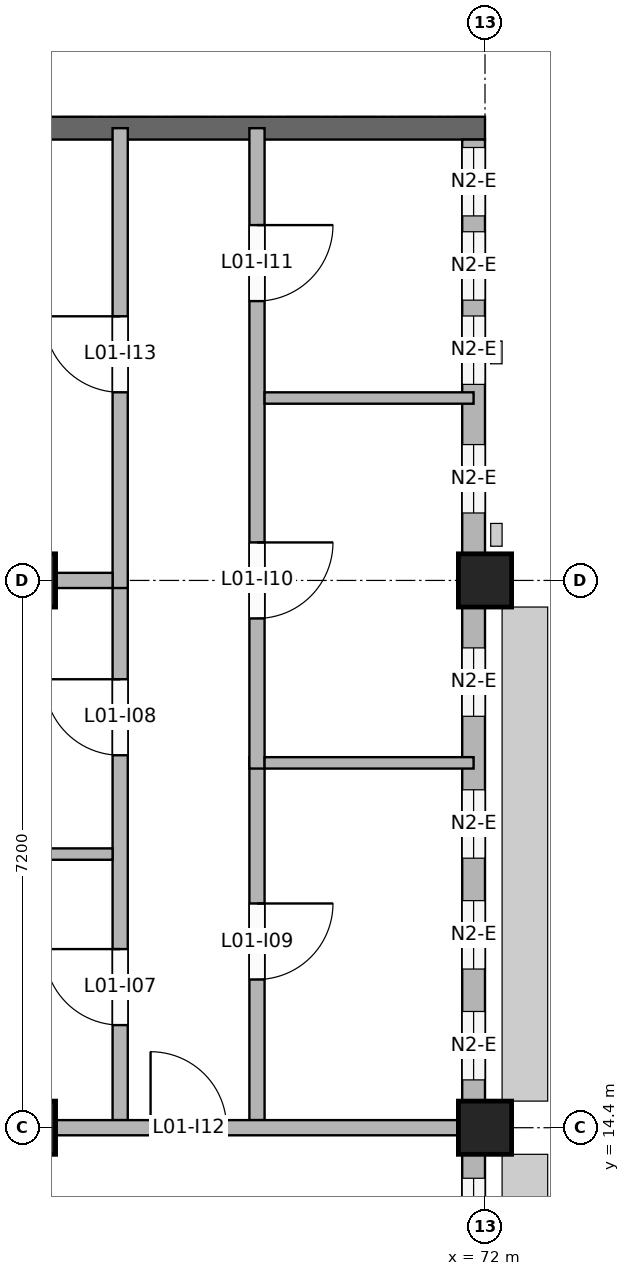
"""IFC4 building model, lengths in metres.
Left out: names, types, materials, properties, quantities, classifications, styles, units other than length and angle.
Written with IfcOpenShell. Run it as: python <this file> out.ifc"""

import sys

from ifc_helpers import new_model, si_unit, direction, frame, frame_2d, origin, origin_2d, place, context, subcontext, project, spatial, rectangle, extrude, element, fill, save


model = new_model("IFC4")
c1 = context("Model", 3, precision=1e-05, world=origin(), true_north=direction((0.0, 1.0)))
c2 = subcontext(c1, "Body", "Model", "MODEL_VIEW")
j1 = project(units=[si_unit("LENGTHUNIT", "METRE"), si_unit("PLANEANGLEUNIT", "RADIAN")], contexts=[c1])
p1 = place(None, origin())
s1 = spatial("IfcSite", under=j1, at=p1, CompositionType="ELEMENT")
p2 = place(p1, origin())
s2 = spatial("IfcBuilding", under=s1, at=p2, CompositionType="ELEMENT")
p3 = place(p2, frame((0.0, 0.0, 4.2)))
s3 = spatial("IfcBuildingStorey", under=s2, at=p3, CompositionType="ELEMENT", Elevation=4.2)
for number, where, z_axis, x_axis in (
    (1, (66.0, 14.4, 0.0), (0.0, 0.0, 1.0), (1.0, 0.0, 0.0)),
    (2, (72.0, 14.4, 0.0), (0.0, 0.0, 1.0), (1.0, 0.0, 0.0)),
    (3, (66.0, 21.6, 0.0), (0.0, 0.0, 1.0), (1.0, 0.0, 0.0)),
    (4, (72.0, 21.6, 0.0), (0.0, 0.0, 1.0), (1.0, 0.0, 0.0)),
):
    element("IfcColumn", number, at=place(p3, frame(where, z_axis=z_axis, x_axis=x_axis)), inside=s3, PredefinedType="COLUMN", context=c2, shape_type="SweptSolid", body=[
        extrude(rectangle(XDim=0.7, YDim=0.7, at=origin_2d()), origin(), (0.0, 0.0, 1.0), 3.95),
    ])
p4 = place(p3, frame((71.85, 7.2, 0.0), z_axis=(0.0, 0.0, 1.0), x_axis=(0.0, 1.0, 0.0)))
e5 = element("IfcWall", 5, at=p4, inside=s3, PredefinedType="SOLIDWALL", context=c2, shape_type="SweptSolid", body=[
    extrude(rectangle(XDim=6.85, YDim=0.3, at=frame_2d((3.425, 0.0))), origin(), (0.0, 0.0, 1.0), 3.05),
])
p5 = place(p4, frame((5.635, 0.0, 0.9)))
e6 = element("IfcOpeningElement", 6, at=p5, cuts=e5, PredefinedType="OPENING", context=c2, shape_type="SweptSolid", body=[
    extrude(rectangle(XDim=0.9, YDim=1.2, at=frame_2d((0.45, 0.6))), frame((0.0, 0.16, 0.0), z_axis=(0.0, -1.0, 0.0), x_axis=(1.0, 0.0, 0.0)), (0.0, 0.0, 1.0), 0.32),
])
p6 = place(p3, frame((71.85, 14.75, 0.0), z_axis=(0.0, 0.0, 1.0), x_axis=(0.0, 1.0, 0.0)))
e7 = element("IfcWall", 7, at=p6, inside=s3, PredefinedType="SOLIDWALL", context=c2, shape_type="SweptSolid", body=[
    extrude(rectangle(XDim=6.5, YDim=0.3, at=frame_2d((3.25, 0.0))), origin(), (0.0, 0.0, 1.0), 3.05),
])
p7 = place(p6, frame((0.279, 0.0, 0.9)))
e8 = element("IfcOpeningElement", 8, at=p7, cuts=e7, PredefinedType="OPENING", context=c2, shape_type="SweptSolid", body=[
    extrude(rectangle(XDim=0.9, YDim=1.2, at=frame_2d((0.45, 0.6))), frame((0.0, 0.16, 0.0), z_axis=(0.0, -1.0, 0.0), x_axis=(1.0, 0.0, 0.0)), (0.0, 0.0, 1.0), 0.32),
])
p8 = place(p6, frame((1.738, 0.0, 0.9)))
e9 = element("IfcOpeningElement", 9, at=p8, cuts=e7, PredefinedType="OPENING", context=c2, shape_type="SweptSolid", body=[
    extrude(rectangle(XDim=0.9, YDim=1.2, at=frame_2d((0.45, 0.6))), frame((0.0, 0.16, 0.0), z_axis=(0.0, -1.0, 0.0), x_axis=(1.0, 0.0, 0.0)), (0.0, 0.0, 1.0), 0.32),
])
p9 = place(p6, frame((3.196, 0.0, 0.9)))
e10 = element("IfcOpeningElement", 10, at=p9, cuts=e7, PredefinedType="OPENING", context=c2, shape_type="SweptSolid", body=[
    extrude(rectangle(XDim=0.9, YDim=1.2, at=frame_2d((0.45, 0.6))), frame((0.0, 0.16, 0.0), z_axis=(0.0, -1.0, 0.0), x_axis=(1.0, 0.0, 0.0)), (0.0, 0.0, 1.0), 0.32),
])
p10 = place(p6, frame((5.062, 0.0, 0.9)))
e11 = element("IfcOpeningElement", 11, at=p10, cuts=e7, PredefinedType="OPENING", context=c2, shape_type="SweptSolid", body=[
    extrude(rectangle(XDim=0.9, YDim=1.2, at=frame_2d((0.45, 0.6))), frame((0.0, 0.16, 0.0), z_axis=(0.0, -1.0, 0.0), x_axis=(1.0, 0.0, 0.0)), (0.0, 0.0, 1.0), 0.32),
])
p11 = place(p3, frame((71.85, 21.95, 0.0), z_axis=(0.0, 0.0, 1.0), x_axis=(0.0, 1.0, 0.0)))
e12 = element("IfcWall", 12, at=p11, inside=s3, PredefinedType="SOLIDWALL", context=c2, shape_type="SweptSolid", body=[
    extrude(rectangle(XDim=5.45, YDim=0.3, at=frame_2d((2.725, 0.0))), origin(), (0.0, 0.0, 1.0), 3.75),
])
p12 = place(p11, frame((0.538, 0.0, 0.9)))
e13 = element("IfcOpeningElement", 13, at=p12, cuts=e12, PredefinedType="OPENING", context=c2, shape_type="SweptSolid", body=[
    extrude(rectangle(XDim=0.9, YDim=1.2, at=frame_2d((0.45, 0.6))), frame((0.0, 0.16, 0.0), z_axis=(0.0, -1.0, 0.0), x_axis=(1.0, 0.0, 0.0)), (0.0, 0.0, 1.0), 0.32),
])
p13 = place(p11, frame((2.229, 0.0, 0.9)))
e14 = element("IfcOpeningElement", 14, at=p13, cuts=e12, PredefinedType="OPENING", context=c2, shape_type="SweptSolid", body=[
    extrude(rectangle(XDim=0.9, YDim=1.2, at=frame_2d((0.45, 0.6))), frame((0.0, 0.16, 0.0), z_axis=(0.0, -1.0, 0.0), x_axis=(1.0, 0.0, 0.0)), (0.0, 0.0, 1.0), 0.32),
])
p14 = place(p11, frame((3.337, 0.0, 0.9)))
e15 = element("IfcOpeningElement", 15, at=p14, cuts=e12, PredefinedType="OPENING", context=c2, shape_type="SweptSolid", body=[
    extrude(rectangle(XDim=0.9, YDim=1.2, at=frame_2d((0.45, 0.6))), frame((0.0, 0.16, 0.0), z_axis=(0.0, -1.0, 0.0), x_axis=(1.0, 0.0, 0.0)), (0.0, 0.0, 1.0), 0.32),
])
p15 = place(p11, frame((4.446, 0.0, 0.9)))
e16 = element("IfcOpeningElement", 16, at=p15, cuts=e12, PredefinedType="OPENING", context=c2, shape_type="SweptSolid", body=[
    extrude(rectangle(XDim=0.9, YDim=1.2, at=frame_2d((0.45, 0.6))), frame((0.0, 0.16, 0.0), z_axis=(0.0, -1.0, 0.0), x_axis=(1.0, 0.0, 0.0)), (0.0, 0.0, 1.0), 0.32),
])
p16 = place(p3, frame((60.0, 27.55, 0.0), z_axis=(0.0, 0.0, 1.0), x_axis=(1.0, 0.0, 0.0)))
e17 = element("IfcWall", 17, at=p16, inside=s3, PredefinedType="SOLIDWALL", context=c2, shape_type="SweptSolid", body=[
    extrude(rectangle(XDim=12.0, YDim=0.3, at=frame_2d((6.0, 0.0))), origin(), (0.0, 0.0, 1.0), 3.75),
])
p17 = place(p3, frame((67.2, 14.5, 0.0), z_axis=(0.0, 0.0, 1.0), x_axis=(0.0, 1.0, 0.0)))
e18 = element("IfcWall", 18, at=p17, inside=s3, PredefinedType="PARTITIONING", context=c2, shape_type="SweptSolid", body=[
    extrude(rectangle(XDim=7.2, YDim=0.2, at=frame_2d((3.6, 0.0))), origin(), (0.0, 0.0, 1.0), 2.55),
])
p18 = place(p17, frame((1.25, 0.0, 0.0)))
e19 = element("IfcOpeningElement", 19, at=p18, cuts=e18, PredefinedType="OPENING", context=c2, shape_type="SweptSolid", body=[
    extrude(rectangle(XDim=1.0, YDim=2.1, at=frame_2d((0.5, 1.05))), frame((0.0, 0.11, 0.0), z_axis=(0.0, -1.0, 0.0), x_axis=(1.0, 0.0, 0.0)), (0.0, 0.0, 1.0), 0.22),
])
p19 = place(p17, frame((4.8, 0.0, 0.0)))
e20 = element("IfcOpeningElement", 20, at=p19, cuts=e18, PredefinedType="OPENING", context=c2, shape_type="SweptSolid", body=[
    extrude(rectangle(XDim=1.0, YDim=2.1, at=frame_2d((0.5, 1.05))), frame((0.0, 0.11, 0.0), z_axis=(0.0, -1.0, 0.0), x_axis=(1.0, 0.0, 0.0)), (0.0, 0.0, 1.0), 0.22),
])
p20 = place(p3, frame((67.2, 21.5, 0.0), z_axis=(0.0, 0.0, 1.0), x_axis=(0.0, 1.0, 0.0)))
e21 = element("IfcWall", 21, at=p20, inside=s3, PredefinedType="PARTITIONING", context=c2, shape_type="SweptSolid", body=[
    extrude(rectangle(XDim=6.05, YDim=0.2, at=frame_2d((3.025, 0.0))), origin(), (0.0, 0.0, 1.0), 2.55),
])
p21 = place(p20, frame((2.575, 0.0, 0.0)))
e22 = element("IfcOpeningElement", 22, at=p21, cuts=e21, PredefinedType="OPENING", context=c2, shape_type="SweptSolid", body=[
    extrude(rectangle(XDim=1.0, YDim=2.1, at=frame_2d((0.5, 1.05))), frame((0.0, 0.11, 0.0), z_axis=(0.0, -1.0, 0.0), x_axis=(1.0, 0.0, 0.0)), (0.0, 0.0, 1.0), 0.22),
])
p22 = place(p3, frame((69.0, 14.5, 0.0), z_axis=(0.0, 0.0, 1.0), x_axis=(0.0, 1.0, 0.0)))
e23 = element("IfcWall", 23, at=p22, inside=s3, PredefinedType="PARTITIONING", context=c2, shape_type="SweptSolid", body=[
    extrude(rectangle(XDim=4.775, YDim=0.2, at=frame_2d((2.387, 0.0))), origin(), (0.0, 0.0, 1.0), 3.15),
])
p23 = place(p22, frame((1.85, 0.0, 0.0)))
e24 = element("IfcOpeningElement", 24, at=p23, cuts=e23, PredefinedType="OPENING", context=c2, shape_type="SweptSolid", body=[
    extrude(rectangle(XDim=1.0, YDim=2.1, at=frame_2d((0.5, 1.05))), frame((0.0, 0.11, 0.0), z_axis=(0.0, -1.0, 0.0), x_axis=(1.0, 0.0, 0.0)), (0.0, 0.0, 1.0), 0.22),
])
p24 = place(p3, frame((69.0, 19.125, 0.0), z_axis=(0.0, 0.0, 1.0), x_axis=(0.0, 1.0, 0.0)))
e25 = element("IfcWall", 25, at=p24, inside=s3, PredefinedType="PARTITIONING", context=c2, shape_type="SweptSolid", body=[
    extrude(rectangle(XDim=8.425, YDim=0.2, at=frame_2d((4.212, 0.0))), origin(), (0.0, 0.0, 1.0), 2.55),
])
p25 = place(p24, frame((1.975, 0.0, 0.0)))
e26 = element("IfcOpeningElement", 26, at=p25, cuts=e25, PredefinedType="OPENING", context=c2, shape_type="SweptSolid", body=[
    extrude(rectangle(XDim=1.0, YDim=2.1, at=frame_2d((0.5, 1.05))), frame((0.0, 0.11, 0.0), z_axis=(0.0, -1.0, 0.0), x_axis=(1.0, 0.0, 0.0)), (0.0, 0.0, 1.0), 0.22),
])
p26 = place(p24, frame((6.15, 0.0, 0.0)))
e27 = element("IfcOpeningElement", 27, at=p26, cuts=e25, PredefinedType="OPENING", context=c2, shape_type="SweptSolid", body=[
    extrude(rectangle(XDim=1.0, YDim=2.1, at=frame_2d((0.5, 1.05))), frame((0.0, 0.11, 0.0), z_axis=(0.0, -1.0, 0.0), x_axis=(1.0, 0.0, 0.0)), (0.0, 0.0, 1.0), 0.22),
])
p27 = place(p3, frame((66.35, 14.4, 0.0), z_axis=(0.0, 0.0, 1.0), x_axis=(1.0, 0.0, 0.0)))
e28 = element("IfcWall", 28, at=p27, inside=s3, PredefinedType="PARTITIONING", context=c2, shape_type="SweptSolid", body=[
    extrude(rectangle(XDim=5.3, YDim=0.2, at=frame_2d((2.65, 0.0))), origin(), (0.0, 0.0, 1.0), 3.15),
])
p28 = place(p27, frame((1.25, 0.0, 0.0)))
e29 = element("IfcOpeningElement", 29, at=p28, cuts=e28, PredefinedType="OPENING", context=c2, shape_type="SweptSolid", body=[
    extrude(rectangle(XDim=1.0, YDim=2.1, at=frame_2d((0.5, 1.05))), frame((0.0, 0.11, 0.0), z_axis=(0.0, -1.0, 0.0), x_axis=(1.0, 0.0, 0.0)), (0.0, 0.0, 1.0), 0.22),
])
p29 = place(p3, frame((63.0, 18.0, 0.0), z_axis=(0.0, 0.0, 1.0), x_axis=(1.0, 0.0, 0.0)))
e30 = element("IfcWall", 30, at=p29, inside=s3, PredefinedType="PARTITIONING", context=c2, shape_type="SweptSolid", body=[
    extrude(rectangle(XDim=4.1, YDim=0.15, at=frame_2d((2.05, 0.0))), origin(), (0.0, 0.0, 1.0), 3.05),
])
p30 = place(p3, frame((69.1, 19.2, 0.0), z_axis=(0.0, 0.0, 1.0), x_axis=(1.0, 0.0, 0.0)))
e31 = element("IfcWall", 31, at=p30, inside=s3, PredefinedType="PARTITIONING", context=c2, shape_type="SweptSolid", body=[
    extrude(rectangle(XDim=2.75, YDim=0.15, at=frame_2d((1.375, 0.0))), origin(), (0.0, 0.0, 1.0), 3.05),
])
p31 = place(p3, frame((63.075, 21.6, 0.0), z_axis=(0.0, 0.0, 1.0), x_axis=(1.0, 0.0, 0.0)))
e32 = element("IfcWall", 32, at=p31, inside=s3, PredefinedType="PARTITIONING", context=c2, shape_type="SweptSolid", body=[
    extrude(rectangle(XDim=4.025, YDim=0.2, at=frame_2d((2.013, 0.0))), origin(), (0.0, 0.0, 1.0), 2.55),
])
p32 = place(p3, frame((69.1, 24.0, 0.0), z_axis=(0.0, 0.0, 1.0), x_axis=(1.0, 0.0, 0.0)))
e33 = element("IfcWall", 33, at=p32, inside=s3, PredefinedType="PARTITIONING", context=c2, shape_type="SweptSolid", body=[
    extrude(rectangle(XDim=2.75, YDim=0.15, at=frame_2d((1.375, 0.0))), origin(), (0.0, 0.0, 1.0), 3.75),
])
p33 = place(p5, origin())
e34 = element("IfcWindow", 34, at=p33, inside=s3, PartitioningType="SINGLE_PANEL", PredefinedType="WINDOW", context=c2, shape_type="SweptSolid", body=[
    extrude(rectangle(XDim=0.9, YDim=1.2, at=frame_2d((0.45, 0.6))), frame((0.0, 0.03, 0.0), z_axis=(0.0, -1.0, 0.0), x_axis=(1.0, 0.0, 0.0)), (0.0, 0.0, 1.0), 0.06),
])
fill(e6, e34)
p34 = place(p7, origin())
e35 = element("IfcWindow", 35, at=p34, inside=s3, PartitioningType="SINGLE_PANEL", PredefinedType="WINDOW", context=c2, shape_type="SweptSolid", body=[
    extrude(rectangle(XDim=0.9, YDim=1.2, at=frame_2d((0.45, 0.6))), frame((0.0, 0.03, 0.0), z_axis=(0.0, -1.0, 0.0), x_axis=(1.0, 0.0, 0.0)), (0.0, 0.0, 1.0), 0.06),
])
fill(e8, e35)
p35 = place(p8, origin())
e36 = element("IfcWindow", 36, at=p35, inside=s3, PartitioningType="SINGLE_PANEL", PredefinedType="WINDOW", context=c2, shape_type="SweptSolid", body=[
    extrude(rectangle(XDim=0.9, YDim=1.2, at=frame_2d((0.45, 0.6))), frame((0.0, 0.03, 0.0), z_axis=(0.0, -1.0, 0.0), x_axis=(1.0, 0.0, 0.0)), (0.0, 0.0, 1.0), 0.06),
])
fill(e9, e36)
p36 = place(p9, origin())
e37 = element("IfcWindow", 37, at=p36, inside=s3, PartitioningType="SINGLE_PANEL", PredefinedType="WINDOW", context=c2, shape_type="SweptSolid", body=[
    extrude(rectangle(XDim=0.9, YDim=1.2, at=frame_2d((0.45, 0.6))), frame((0.0, 0.03, 0.0), z_axis=(0.0, -1.0, 0.0), x_axis=(1.0, 0.0, 0.0)), (0.0, 0.0, 1.0), 0.06),
])
fill(e10, e37)
p37 = place(p10, origin())
e38 = element("IfcWindow", 38, at=p37, inside=s3, PartitioningType="SINGLE_PANEL", PredefinedType="WINDOW", context=c2, shape_type="SweptSolid", body=[
    extrude(rectangle(XDim=0.9, YDim=1.2, at=frame_2d((0.45, 0.6))), frame((0.0, 0.03, 0.0), z_axis=(0.0, -1.0, 0.0), x_axis=(1.0, 0.0, 0.0)), (0.0, 0.0, 1.0), 0.06),
])
fill(e11, e38)
p38 = place(p12, origin())
e39 = element("IfcWindow", 39, at=p38, inside=s3, PartitioningType="SINGLE_PANEL", PredefinedType="WINDOW", context=c2, shape_type="SweptSolid", body=[
    extrude(rectangle(XDim=0.9, YDim=1.2, at=frame_2d((0.45, 0.6))), frame((0.0, 0.03, 0.0), z_axis=(0.0, -1.0, 0.0), x_axis=(1.0, 0.0, 0.0)), (0.0, 0.0, 1.0), 0.06),
])
fill(e13, e39)
p39 = place(p13, origin())
e40 = element("IfcWindow", 40, at=p39, inside=s3, PartitioningType="SINGLE_PANEL", PredefinedType="WINDOW", context=c2, shape_type="SweptSolid", body=[
    extrude(rectangle(XDim=0.9, YDim=1.2, at=frame_2d((0.45, 0.6))), frame((0.0, 0.03, 0.0), z_axis=(0.0, -1.0, 0.0), x_axis=(1.0, 0.0, 0.0)), (0.0, 0.0, 1.0), 0.06),
])
fill(e14, e40)
p40 = place(p14, origin())
e41 = element("IfcWindow", 41, at=p40, inside=s3, PartitioningType="SINGLE_PANEL", PredefinedType="WINDOW", context=c2, shape_type="SweptSolid", body=[
    extrude(rectangle(XDim=0.9, YDim=1.2, at=frame_2d((0.45, 0.6))), frame((0.0, 0.03, 0.0), z_axis=(0.0, -1.0, 0.0), x_axis=(1.0, 0.0, 0.0)), (0.0, 0.0, 1.0), 0.06),
])
fill(e15, e41)
p41 = place(p15, origin())
e42 = element("IfcWindow", 42, at=p41, inside=s3, PartitioningType="SINGLE_PANEL", PredefinedType="WINDOW", context=c2, shape_type="SweptSolid", body=[
    extrude(rectangle(XDim=0.9, YDim=1.2, at=frame_2d((0.45, 0.6))), frame((0.0, 0.03, 0.0), z_axis=(0.0, -1.0, 0.0), x_axis=(1.0, 0.0, 0.0)), (0.0, 0.0, 1.0), 0.06),
])
fill(e16, e42)
p42 = place(p18, origin())
e43 = element("IfcDoor", 43, at=p42, inside=s3, OperationType="SINGLE_SWING_RIGHT", PredefinedType="DOOR", context=c2, shape_type="SweptSolid", body=[
    extrude(rectangle(XDim=1.0, YDim=2.1, at=frame_2d((0.5, 1.05))), frame((0.0, 0.025, 0.0), z_axis=(0.0, -1.0, 0.0), x_axis=(1.0, 0.0, 0.0)), (0.0, 0.0, 1.0), 0.05),
])
fill(e19, e43)
p43 = place(p19, origin())
e44 = element("IfcDoor", 44, at=p43, inside=s3, OperationType="SINGLE_SWING_RIGHT", PredefinedType="DOOR", context=c2, shape_type="SweptSolid", body=[
    extrude(rectangle(XDim=1.0, YDim=2.1, at=frame_2d((0.5, 1.05))), frame((0.0, 0.025, 0.0), z_axis=(0.0, -1.0, 0.0), x_axis=(1.0, 0.0, 0.0)), (0.0, 0.0, 1.0), 0.05),
])
fill(e20, e44)
p44 = place(p23, frame((1.0, 0.0, 0.0), z_axis=(0.0, 0.0, 1.0), x_axis=(-1.0, 0.0, 0.0)))
e45 = element("IfcDoor", 45, at=p44, inside=s3, OperationType="SINGLE_SWING_LEFT", PredefinedType="DOOR", context=c2, shape_type="SweptSolid", body=[
    extrude(rectangle(XDim=1.0, YDim=2.1, at=frame_2d((0.5, 1.05))), frame((0.0, 0.025, 0.0), z_axis=(0.0, -1.0, 0.0), x_axis=(1.0, 0.0, 0.0)), (0.0, 0.0, 1.0), 0.05),
])
fill(e24, e45)
p45 = place(p25, frame((1.0, 0.0, 0.0), z_axis=(0.0, 0.0, 1.0), x_axis=(-1.0, 0.0, 0.0)))
e46 = element("IfcDoor", 46, at=p45, inside=s3, OperationType="SINGLE_SWING_LEFT", PredefinedType="DOOR", context=c2, shape_type="SweptSolid", body=[
    extrude(rectangle(XDim=1.0, YDim=2.1, at=frame_2d((0.5, 1.05))), frame((0.0, 0.025, 0.0), z_axis=(0.0, -1.0, 0.0), x_axis=(1.0, 0.0, 0.0)), (0.0, 0.0, 1.0), 0.05),
])
fill(e26, e46)
p46 = place(p26, frame((1.0, 0.0, 0.0), z_axis=(0.0, 0.0, 1.0), x_axis=(-1.0, 0.0, 0.0)))
e47 = element("IfcDoor", 47, at=p46, inside=s3, OperationType="SINGLE_SWING_LEFT", PredefinedType="DOOR", context=c2, shape_type="SweptSolid", body=[
    extrude(rectangle(XDim=1.0, YDim=2.1, at=frame_2d((0.5, 1.05))), frame((0.0, 0.025, 0.0), z_axis=(0.0, -1.0, 0.0), x_axis=(1.0, 0.0, 0.0)), (0.0, 0.0, 1.0), 0.05),
])
fill(e27, e47)
p47 = place(p28, origin())
e48 = element("IfcDoor", 48, at=p47, inside=s3, OperationType="SINGLE_SWING_LEFT", PredefinedType="DOOR", context=c2, shape_type="SweptSolid", body=[
    extrude(rectangle(XDim=1.0, YDim=2.1, at=frame_2d((0.5, 1.05))), frame((0.0, 0.025, 0.0), z_axis=(0.0, -1.0, 0.0), x_axis=(1.0, 0.0, 0.0)), (0.0, 0.0, 1.0), 0.05),
])
fill(e29, e48)
p48 = place(p21, origin())
e49 = element("IfcDoor", 49, at=p48, inside=s3, OperationType="SINGLE_SWING_RIGHT", PredefinedType="DOOR", context=c2, shape_type="SweptSolid", body=[
    extrude(rectangle(XDim=1.0, YDim=2.1, at=frame_2d((0.5, 1.05))), frame((0.0, 0.025, 0.0), z_axis=(0.0, -1.0, 0.0), x_axis=(1.0, 0.0, 0.0)), (0.0, 0.0, 1.0), 0.05),
])
fill(e22, e49)
save(model, sys.argv[1])
